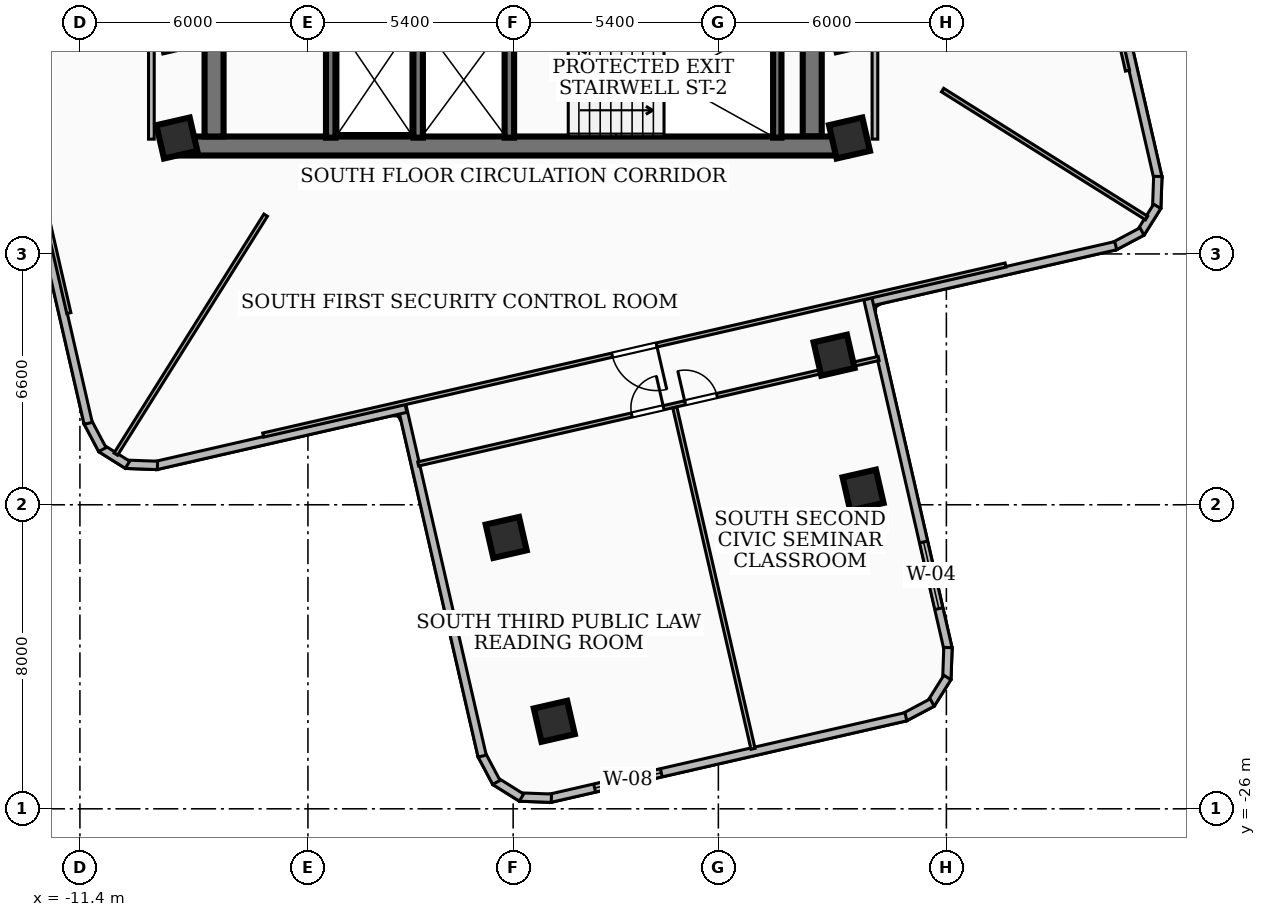
"""IFC4 building model, lengths in metres.
Left out: names, types, materials, properties, quantities, classifications, styles, units other than length and angle.
Written with IfcOpenShell. Run it as: python <this file> out.ifc"""

import sys

from ifc_helpers import new_model, si_unit, direction, frame, frame_2d, origin, origin_2d, place, context, subcontext, project, spatial, rectangle, extrude, element, fill, save


model = new_model("IFC4")
c1 = context("Model", 3, precision=1e-05, world=origin(), true_north=direction((0.0, 1.0)))
c2 = subcontext(c1, "Body", "Model", "MODEL_VIEW")
j1 = project(units=[si_unit("LENGTHUNIT", "METRE"), si_unit("PLANEANGLEUNIT", "RADIAN")], contexts=[c1])
p1 = place(None, origin())
s1 = spatial("IfcSite", under=j1, at=p1, CompositionType="ELEMENT")
p2 = place(p1, origin())
s2 = spatial("IfcBuilding", under=s1, at=p2, CompositionType="ELEMENT")
p3 = place(p2, frame((0.0, 0.0, 123.48)))
s3 = spatial("IfcBuildingStorey", under=s2, at=p3, CompositionType="ELEMENT", Elevation=123.48)
p4 = place(p3, frame((8.78, -8.56, 0.0), z_axis=(0.0, 0.0, 1.0), x_axis=(-1.0, 0.0, 0.0)))
e1 = element("IfcWall", 1, at=p4, inside=s3, PredefinedType="SHEAR", context=c2, shape_type="SweptSolid", body=[
    extrude(rectangle(XDim=17.56, YDim=0.5, at=frame_2d((8.78, 0.0))), origin(), (0.0, 0.0, 1.0), 3.34),
])
for number, where, z_axis, x_axis in (
    (2, (-7.87, -8.31, 0.0), (0.0, 0.0, 1.0), (0.0, 1.0, 0.0)),
    (3, (7.87, -2.0, 0.0), (0.0, 0.0, 1.0), (0.0, -1.0, 0.0)),
):
    element("IfcWall", number, at=place(p3, frame(where, z_axis=z_axis, x_axis=x_axis)), inside=s3, PredefinedType="SHEAR", context=c2, shape_type="SweptSolid", body=[
        extrude(rectangle(XDim=6.31, YDim=0.5, at=frame_2d((3.155, 0.0))), origin(), (0.0, 0.0, 1.0), 3.34),
    ])
p5 = place(p3, frame((6.95, -8.34, 0.0), z_axis=(0.0, 0.0, 1.0), x_axis=(0.0, 1.0, 0.0)))
e4 = element("IfcWall", 4, at=p5, inside=s3, PredefinedType="SOLIDWALL", context=c2, shape_type="SweptSolid", body=[
    extrude(rectangle(XDim=3.06, YDim=0.22, at=frame_2d((1.53, 0.0))), origin(), (0.0, 0.0, 1.0), 3.34),
])
for number, where, z_axis, x_axis in (
    (5, (-0.1, -8.34, 0.0), (0.0, 0.0, 1.0), (0.0, 1.0, 0.0)),
    (6, (-2.5, -8.34, 0.0), (0.0, 0.0, 1.0), (0.0, 1.0, 0.0)),
    (7, (-4.8, -8.34, 0.0), (0.0, 0.0, 1.0), (0.0, 1.0, 0.0)),
):
    element("IfcWall", number, at=place(p3, frame(where, z_axis=z_axis, x_axis=x_axis)), inside=s3, PredefinedType="SOLIDWALL", context=c2, shape_type="SweptSolid", body=[
        extrude(rectangle(XDim=3.04, YDim=0.25, at=frame_2d((1.52, 0.0))), origin(), (0.0, 0.0, 1.0), 3.34),
    ])
for number, where, z_axis, x_axis in (
    (8, (8.85, -8.35, 0.0), (0.0, 0.0, 1.0), (0.975, 0.223, 0.0)),
    (9, (-8.85, -8.35, 0.0), (0.0, 0.0, 1.0), (0.975, 0.223, 0.0)),
    (10, (-0.183, -18.86, 0.0), (0.0, 0.0, 1.0), (0.975, 0.223, 0.0)),
    (11, (8.445, -14.064, 0.0), (0.0, 0.0, 1.0), (0.975, 0.223, 0.0)),
    (12, (1.083, -23.697, 0.0), (0.0, 0.0, 1.0), (0.975, 0.223, 0.0)),
    (13, (9.208, -17.615, 0.0), (0.0, 0.0, 1.0), (0.975, 0.223, 0.0)),
):
    element("IfcColumn", number, at=place(p3, frame(where, z_axis=z_axis, x_axis=x_axis)), inside=s3, PredefinedType="COLUMN", context=c2, shape_type="SweptSolid", body=[
        extrude(rectangle(XDim=0.9, YDim=0.9, at=origin_2d()), origin(), (0.0, 0.0, 1.0), 3.6),
    ])
p6 = place(p3, frame((15.46, -2.821, 0.0), z_axis=(0.0, 0.0, 1.0), x_axis=(0.223278912438, -0.974754598481, 0.0)))
e14 = element("IfcWall", 14, at=p6, inside=s3, PredefinedType="SOLIDWALL", context=c2, shape_type="SweptSolid", body=[
    extrude(rectangle(XDim=6.759, YDim=0.22, at=frame_2d((3.379, 0.0))), origin(), (0.0, 0.0, 1.0), 3.34),
])
p7 = place(p3, frame((16.964, -9.36, 0.0), z_axis=(0.0, 0.0, 1.0), x_axis=(-0.035983706773, -0.999352376715, 0.0)))
e15 = element("IfcWall", 15, at=p7, inside=s3, PredefinedType="SOLIDWALL", context=c2, shape_type="SweptSolid", body=[
    extrude(rectangle(XDim=0.834, YDim=0.22, at=frame_2d((0.417, 0.0))), origin(), (0.0, 0.0, 1.0), 3.34),
])
p8 = place(p3, frame((16.948, -10.148, 0.0), z_axis=(0.0, 0.0, 1.0), x_axis=(-0.531096868492, -0.847311109497, 0.0)))
e16 = element("IfcWall", 16, at=p8, inside=s3, PredefinedType="SOLIDWALL", context=c2, shape_type="SweptSolid", body=[
    extrude(rectangle(XDim=0.819, YDim=0.22, at=frame_2d((0.41, 0.0))), origin(), (0.0, 0.0, 1.0), 3.34),
])
p9 = place(p3, frame((16.548, -10.809, 0.0), z_axis=(0.0, 0.0, 1.0), x_axis=(-0.883460266876, -0.468506090516, 0.0)))
e17 = element("IfcWall", 17, at=p9, inside=s3, PredefinedType="SOLIDWALL", context=c2, shape_type="SweptSolid", body=[
    extrude(rectangle(XDim=0.834, YDim=0.22, at=frame_2d((0.417, 0.0))), origin(), (0.0, 0.0, 1.0), 3.34),
])
p10 = place(p3, frame((15.857, -11.182, 0.0), z_axis=(0.0, 0.0, 1.0), x_axis=(-0.974754598481, -0.223278912438, 0.0)))
e18 = element("IfcWall", 18, at=p10, inside=s3, PredefinedType="SOLIDWALL", context=c2, shape_type="SweptSolid", body=[
    extrude(rectangle(XDim=6.759, YDim=0.22, at=frame_2d((3.379, 0.0))), origin(), (0.0, 0.0, 1.0), 3.34),
])
p11 = place(p3, frame((9.335, -12.585, 0.0), z_axis=(0.0, 0.0, 1.0), x_axis=(0.223290835532, -0.974751867281, 0.0)))
e19 = element("IfcWall", 19, at=p11, inside=s3, PredefinedType="SOLIDWALL", context=c2, shape_type="SweptSolid", body=[
    extrude(rectangle(XDim=9.459, YDim=0.22, at=frame_2d((4.729, 0.0))), origin(), (0.0, 0.0, 1.0), 3.34),
])
p12 = place(p11, frame((6.559, 0.0, 0.85)))
e20 = element("IfcOpeningElement", 20, at=p12, cuts=e19, PredefinedType="OPENING", context=c2, shape_type="SweptSolid", body=[
    extrude(rectangle(XDim=1.8, YDim=2.0, at=frame_2d((0.9, 1.0))), frame((0.0, 0.12, 0.0), z_axis=(0.0, -1.0, 0.0), x_axis=(1.0, 0.0, 0.0)), (0.0, 0.0, 1.0), 0.24),
])
p13 = place(p3, frame((11.442, -21.756, 0.0), z_axis=(0.0, 0.0, 1.0), x_axis=(-0.035691530512, -0.999362854348, 0.0)))
e21 = element("IfcWall", 21, at=p13, inside=s3, PredefinedType="SOLIDWALL", context=c2, shape_type="SweptSolid", body=[
    extrude(rectangle(XDim=0.834, YDim=0.22, at=frame_2d((0.417, 0.0))), origin(), (0.0, 0.0, 1.0), 3.34),
])
p14 = place(p3, frame((11.426, -22.544, 0.0), z_axis=(0.0, 0.0, 1.0), x_axis=(-0.53163377074, -0.846974340702, 0.0)))
e22 = element("IfcWall", 22, at=p14, inside=s3, PredefinedType="SOLIDWALL", context=c2, shape_type="SweptSolid", body=[
    extrude(rectangle(XDim=0.818, YDim=0.22, at=frame_2d((0.409, 0.0))), origin(), (0.0, 0.0, 1.0), 3.34),
])
p15 = place(p3, frame((11.026, -23.204, 0.0), z_axis=(0.0, 0.0, 1.0), x_axis=(-0.883396009524, -0.468627240307, 0.0)))
e23 = element("IfcWall", 23, at=p15, inside=s3, PredefinedType="SOLIDWALL", context=c2, shape_type="SweptSolid", body=[
    extrude(rectangle(XDim=0.834, YDim=0.22, at=frame_2d((0.417, 0.0))), origin(), (0.0, 0.0, 1.0), 3.34),
])
p16 = place(p3, frame((10.335, -23.577, 0.0), z_axis=(0.0, 0.0, 1.0), x_axis=(-0.974730937235, -0.223382183705, 0.0)))
e24 = element("IfcWall", 24, at=p16, inside=s3, PredefinedType="SOLIDWALL", context=c2, shape_type="SweptSolid", body=[
    extrude(rectangle(XDim=9.621, YDim=0.22, at=frame_2d((4.811, 0.0))), origin(), (0.0, 0.0, 1.0), 3.34),
])
p17 = place(p16, frame((6.604, 0.0, 0.85)))
e25 = element("IfcOpeningElement", 25, at=p17, cuts=e24, PredefinedType="OPENING", context=c2, shape_type="SweptSolid", body=[
    extrude(rectangle(XDim=1.8, YDim=1.8, at=frame_2d((0.9, 0.9))), frame((0.0, 0.12, 0.0), z_axis=(0.0, -1.0, 0.0), x_axis=(1.0, 0.0, 0.0)), (0.0, 0.0, 1.0), 0.24),
])
p18 = place(p3, frame((1.006, -25.721, 0.0), z_axis=(0.0, 0.0, 1.0), x_axis=(-0.999307996296, 0.037195813461, 0.0)))
e26 = element("IfcWall", 26, at=p18, inside=s3, PredefinedType="SOLIDWALL", context=c2, shape_type="SweptSolid", body=[
    extrude(rectangle(XDim=0.833, YDim=0.22, at=frame_2d((0.417, 0.0))), origin(), (0.0, 0.0, 1.0), 3.34),
])
p19 = place(p3, frame((0.219, -25.704, 0.0), z_axis=(0.0, 0.0, 1.0), x_axis=(-0.847847482865, 0.530240177466, 0.0)))
e27 = element("IfcWall", 27, at=p19, inside=s3, PredefinedType="SOLIDWALL", context=c2, shape_type="SweptSolid", body=[
    extrude(rectangle(XDim=0.819, YDim=0.22, at=frame_2d((0.409, 0.0))), origin(), (0.0, 0.0, 1.0), 3.34),
])
p20 = place(p3, frame((-0.442, -25.305, 0.0), z_axis=(0.0, 0.0, 1.0), x_axis=(-0.468250279951, 0.883595877835, 0.0)))
e28 = element("IfcWall", 28, at=p20, inside=s3, PredefinedType="SOLIDWALL", context=c2, shape_type="SweptSolid", body=[
    extrude(rectangle(XDim=0.835, YDim=0.22, at=frame_2d((0.417, 0.0))), origin(), (0.0, 0.0, 1.0), 3.34),
])
p21 = place(p3, frame((-0.815, -24.613, 0.0), z_axis=(0.0, 0.0, 1.0), x_axis=(-0.223313309104, 0.974746718885, 0.0)))
e29 = element("IfcWall", 29, at=p21, inside=s3, PredefinedType="SOLIDWALL", context=c2, shape_type="SweptSolid", body=[
    extrude(rectangle(XDim=9.458, YDim=0.22, at=frame_2d((4.729, 0.0))), origin(), (0.0, 0.0, 1.0), 2.57),
])
p22 = place(p3, frame((-2.821, -15.46, 0.0), z_axis=(0.0, 0.0, 1.0), x_axis=(-0.974754598481, -0.223278912438, 0.0)))
e30 = element("IfcWall", 30, at=p22, inside=s3, PredefinedType="SOLIDWALL", context=c2, shape_type="SweptSolid", body=[
    extrude(rectangle(XDim=6.759, YDim=0.22, at=frame_2d((3.379, 0.0))), origin(), (0.0, 0.0, 1.0), 2.57),
])
p23 = place(p3, frame((-9.36, -16.964, 0.0), z_axis=(0.0, 0.0, 1.0), x_axis=(-0.999352376715, 0.035983706773, 0.0)))
e31 = element("IfcWall", 31, at=p23, inside=s3, PredefinedType="SOLIDWALL", context=c2, shape_type="SweptSolid", body=[
    extrude(rectangle(XDim=0.834, YDim=0.22, at=frame_2d((0.417, 0.0))), origin(), (0.0, 0.0, 1.0), 3.34),
])
p24 = place(p3, frame((-10.148, -16.948, 0.0), z_axis=(0.0, 0.0, 1.0), x_axis=(-0.847311109497, 0.531096868492, 0.0)))
e32 = element("IfcWall", 32, at=p24, inside=s3, PredefinedType="SOLIDWALL", context=c2, shape_type="SweptSolid", body=[
    extrude(rectangle(XDim=0.819, YDim=0.22, at=frame_2d((0.41, 0.0))), origin(), (0.0, 0.0, 1.0), 3.34),
])
p25 = place(p3, frame((-10.809, -16.548, 0.0), z_axis=(0.0, 0.0, 1.0), x_axis=(-0.468506090516, 0.883460266876, 0.0)))
e33 = element("IfcWall", 33, at=p25, inside=s3, PredefinedType="SOLIDWALL", context=c2, shape_type="SweptSolid", body=[
    extrude(rectangle(XDim=0.834, YDim=0.22, at=frame_2d((0.417, 0.0))), origin(), (0.0, 0.0, 1.0), 3.34),
])
p26 = place(p3, frame((-11.182, -15.857, 0.0), z_axis=(0.0, 0.0, 1.0), x_axis=(-0.223278912438, 0.974754598481, 0.0)))
e34 = element("IfcWall", 34, at=p26, inside=s3, PredefinedType="SOLIDWALL", context=c2, shape_type="SweptSolid", body=[
    extrude(rectangle(XDim=6.759, YDim=0.22, at=frame_2d((3.379, 0.0))), origin(), (0.0, 0.0, 1.0), 2.644),
])
for number, where, z_axis, x_axis in (
    (35, (-9.52, -8.38, 0.0), (0.0, 0.0, 1.0), (0.0, 1.0, 0.0)),
    (36, (9.52, -8.38, 0.0), (0.0, 0.0, 1.0), (0.0, 1.0, 0.0)),
):
    element("IfcWall", number, at=place(p3, frame(where, z_axis=z_axis, x_axis=x_axis)), inside=s3, PredefinedType="PARTITIONING", context=c2, shape_type="SweptSolid", body=[
        extrude(rectangle(XDim=6.63, YDim=0.15, at=frame_2d((3.315, 0.0))), origin(), (0.0, 0.0, 1.0), 2.57),
    ])
p27 = place(p3, frame((-6.512, -10.38, 0.0), z_axis=(0.0, 0.0, 1.0), x_axis=(-0.531323053356, -0.847169294163, 0.0)))
e37 = element("IfcWall", 37, at=p27, inside=s3, PredefinedType="PARTITIONING", context=c2, shape_type="SweptSolid", body=[
    extrude(rectangle(XDim=7.421, YDim=0.11, at=frame_2d((3.711, 0.0))), origin(), (0.0, 0.0, 1.0), 2.57),
])
p28 = place(p3, frame((11.3, -7.089, 0.0), z_axis=(0.0, 0.0, 1.0), x_axis=(0.847172398776, -0.531318103167, 0.0)))
e38 = element("IfcWall", 38, at=p28, inside=s3, PredefinedType="PARTITIONING", context=c2, shape_type="SweptSolid", body=[
    extrude(rectangle(XDim=6.335, YDim=0.11, at=frame_2d((3.167, 0.0))), origin(), (0.0, 0.0, 1.0), 3.34),
])
p29 = place(p3, frame((11.692, 12.957, 0.0), z_axis=(0.0, 0.0, 1.0), x_axis=(0.223262093598, -0.97475845088, 0.0)))
e39 = element("IfcWall", 39, at=p29, inside=s3, PredefinedType="PARTITIONING", context=c2, shape_type="SweptSolid", body=[
    extrude(rectangle(XDim=20.04, YDim=0.11, at=frame_2d((10.02, 0.0))), origin(), (0.0, 0.0, 1.0), 2.57),
])
p30 = place(p29, frame((9.42, 0.0, 0.0)))
e40 = element("IfcOpeningElement", 40, at=p30, cuts=e39, PredefinedType="OPENING", context=c2, shape_type="SweptSolid", body=[
    extrude(rectangle(XDim=1.2, YDim=2.1, at=frame_2d((0.6, 1.05))), frame((0.0, 0.065, 0.0), z_axis=(0.0, -1.0, 0.0), x_axis=(1.0, 0.0, 0.0)), (0.0, 0.0, 1.0), 0.13),
])
p31 = place(p3, frame((-11.692, -12.957, 0.0), z_axis=(0.0, 0.0, 1.0), x_axis=(-0.223262093598, 0.97475845088, 0.0)))
e41 = element("IfcWall", 41, at=p31, inside=s3, PredefinedType="PARTITIONING", context=c2, shape_type="SweptSolid", body=[
    extrude(rectangle(XDim=20.04, YDim=0.11, at=frame_2d((10.02, 0.0))), origin(), (0.0, 0.0, 1.0), 2.57),
])
p32 = place(p31, frame((9.42, 0.0, 0.0)))
e42 = element("IfcOpeningElement", 42, at=p32, cuts=e41, PredefinedType="OPENING", context=c2, shape_type="SweptSolid", body=[
    extrude(rectangle(XDim=1.2, YDim=2.1, at=frame_2d((0.6, 1.05))), frame((0.0, 0.065, 0.0), z_axis=(0.0, -1.0, 0.0), x_axis=(1.0, 0.0, 0.0)), (0.0, 0.0, 1.0), 0.13),
])
p33 = place(p3, frame((12.957, -11.692, 0.0), z_axis=(0.0, 0.0, 1.0), x_axis=(-0.97475845088, -0.223262093598, 0.0)))
e43 = element("IfcWall", 43, at=p33, inside=s3, PredefinedType="PARTITIONING", context=c2, shape_type="SweptSolid", body=[
    extrude(rectangle(XDim=20.04, YDim=0.11, at=frame_2d((10.02, 0.0))), origin(), (0.0, 0.0, 1.0), 2.57),
])
p34 = place(p33, frame((9.42, 0.0, 0.0)))
e44 = element("IfcOpeningElement", 44, at=p34, cuts=e43, PredefinedType="OPENING", context=c2, shape_type="SweptSolid", body=[
    extrude(rectangle(XDim=1.2, YDim=2.1, at=frame_2d((0.6, 1.05))), frame((0.0, 0.065, 0.0), z_axis=(0.0, -1.0, 0.0), x_axis=(1.0, 0.0, 0.0)), (0.0, 0.0, 1.0), 0.13),
])
p35 = place(p3, frame((4.254, -15.44, 0.0), z_axis=(0.0, 0.0, 1.0), x_axis=(0.223344166789, -0.974739648912, 0.0)))
e45 = element("IfcWall", 45, at=p35, inside=s3, PredefinedType="PARTITIONING", context=c2, shape_type="SweptSolid", body=[
    extrude(rectangle(XDim=9.215, YDim=0.11, at=frame_2d((4.607, 0.0))), origin(), (0.0, 0.0, 1.0), 2.72),
])
p36 = place(p3, frame((-2.499, -16.926, 0.0), z_axis=(0.0, 0.0, 1.0), x_axis=(0.974740247341, 0.223341555051, 0.0)))
e46 = element("IfcWall", 46, at=p36, inside=s3, PredefinedType="PARTITIONING", context=c2, shape_type="SweptSolid", body=[
    extrude(rectangle(XDim=12.43, YDim=0.11, at=frame_2d((6.215, 0.0))), origin(), (0.0, 0.0, 1.0), 2.57),
])
p37 = place(p36, frame((5.765, 0.0, 0.0)))
e47 = element("IfcOpeningElement", 47, at=p37, cuts=e46, PredefinedType="OPENING", context=c2, shape_type="SweptSolid", body=[
    extrude(rectangle(XDim=0.86, YDim=2.04, at=frame_2d((0.43, 1.02))), frame((0.0, 0.065, 0.0), z_axis=(0.0, -1.0, 0.0), x_axis=(1.0, 0.0, 0.0)), (0.0, 0.0, 1.0), 0.13),
])
p38 = place(p36, frame((7.205, 0.0, 0.0)))
e48 = element("IfcOpeningElement", 48, at=p38, cuts=e46, PredefinedType="OPENING", context=c2, shape_type="SweptSolid", body=[
    extrude(rectangle(XDim=0.86, YDim=2.04, at=frame_2d((0.43, 1.02))), frame((0.0, 0.065, 0.0), z_axis=(0.0, -1.0, 0.0), x_axis=(1.0, 0.0, 0.0)), (0.0, 0.0, 1.0), 0.13),
])
p39 = place(p12, origin())
e49 = element("IfcWindow", 49, at=p39, inside=s3, PartitioningType="SINGLE_PANEL", PredefinedType="WINDOW", context=c2, shape_type="SweptSolid", body=[
    extrude(rectangle(XDim=1.8, YDim=2.0, at=frame_2d((0.9, 1.0))), frame((0.0, 0.03, 0.0), z_axis=(0.0, -1.0, 0.0), x_axis=(1.0, 0.0, 0.0)), (0.0, 0.0, 1.0), 0.06),
])
fill(e20, e49)
p40 = place(p17, origin())
e50 = element("IfcWindow", 50, at=p40, inside=s3, PartitioningType="SINGLE_PANEL", PredefinedType="WINDOW", context=c2, shape_type="SweptSolid", body=[
    extrude(rectangle(XDim=1.8, YDim=1.8, at=frame_2d((0.9, 0.9))), frame((0.0, 0.03, 0.0), z_axis=(0.0, -1.0, 0.0), x_axis=(1.0, 0.0, 0.0)), (0.0, 0.0, 1.0), 0.06),
])
fill(e25, e50)
p41 = place(p34, origin())
e51 = element("IfcDoor", 51, at=p41, inside=s3, OperationType="SINGLE_SWING_LEFT", PredefinedType="DOOR", context=c2, shape_type="SweptSolid", body=[
    extrude(rectangle(XDim=1.2, YDim=2.1, at=frame_2d((0.6, 1.05))), frame((0.0, 0.025, 0.0), z_axis=(0.0, -1.0, 0.0), x_axis=(1.0, 0.0, 0.0)), (0.0, 0.0, 1.0), 0.05),
])
fill(e44, e51)
p42 = place(p37, origin())
e52 = element("IfcDoor", 52, at=p42, inside=s3, OperationType="SINGLE_SWING_RIGHT", PredefinedType="DOOR", context=c2, shape_type="SweptSolid", body=[
    extrude(rectangle(XDim=0.86, YDim=2.04, at=frame_2d((0.43, 1.02))), frame((0.0, 0.025, 0.0), z_axis=(0.0, -1.0, 0.0), x_axis=(1.0, 0.0, 0.0)), (0.0, 0.0, 1.0), 0.05),
])
fill(e47, e52)
p43 = place(p38, origin())
e53 = element("IfcDoor", 53, at=p43, inside=s3, OperationType="SINGLE_SWING_LEFT", PredefinedType="DOOR", context=c2, shape_type="SweptSolid", body=[
    extrude(rectangle(XDim=0.86, YDim=2.04, at=frame_2d((0.43, 1.02))), frame((0.0, 0.025, 0.0), z_axis=(0.0, -1.0, 0.0), x_axis=(1.0, 0.0, 0.0)), (0.0, 0.0, 1.0), 0.05),
])
fill(e48, e53)
save(model, sys.argv[1])
